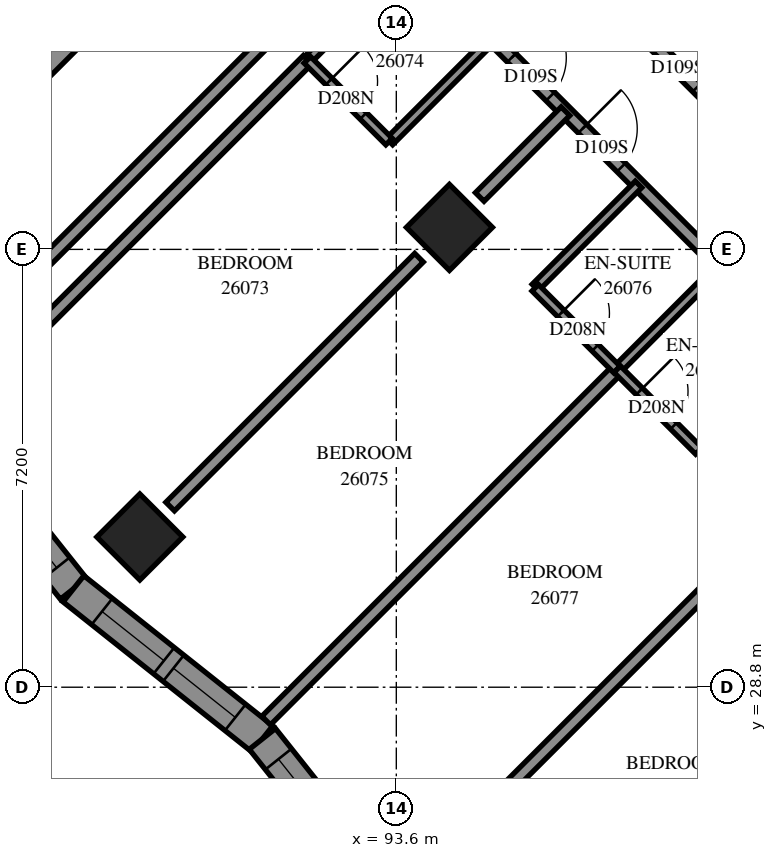
"""IFC4 building model, lengths in metres.
Left out: names, types, materials, properties, quantities, classifications, styles, units other than length and angle.
Written with IfcOpenShell. Run it as: python <this file> out.ifc"""

import sys

from ifc_helpers import new_model, si_unit, direction, frame, frame_2d, origin, origin_2d, place, context, subcontext, project, spatial, polyline, rectangle, outline, extrude, element, fill, save


model = new_model("IFC4")
c1 = context("Model", 3, precision=1e-05, world=origin(), true_north=direction((0.0, 1.0)))
c2 = subcontext(c1, "Body", "Model", "MODEL_VIEW")
j1 = project(units=[si_unit("LENGTHUNIT", "METRE"), si_unit("PLANEANGLEUNIT", "RADIAN")], contexts=[c1])
p1 = place(None, origin())
s1 = spatial("IfcSite", under=j1, at=p1, CompositionType="ELEMENT")
p2 = place(p1, origin())
s2 = spatial("IfcBuilding", under=s1, at=p2, CompositionType="ELEMENT")
p3 = place(p2, frame((0.0, 0.0, 98.2)))
s3 = spatial("IfcBuildingStorey", under=s2, at=p3, CompositionType="ELEMENT", Elevation=98.2)
for number, where, z_axis, x_axis in (
    (1, (94.474, 36.362, 0.0), (0.0, 0.0, 1.0), (0.707, -0.707, 0.0)),
    (2, (89.382, 31.271, 0.0), (0.0, 0.0, 1.0), (0.707, -0.707, 0.0)),
):
    element("IfcColumn", number, at=place(p3, frame(where, z_axis=z_axis, x_axis=x_axis)), inside=s3, PredefinedType="COLUMN", context=c2, shape_type="SweptSolid", body=[
        extrude(rectangle(XDim=1.0, YDim=1.0, at=origin_2d()), origin(), (0.0, 0.0, 1.0), 3.1),
    ])
p4 = place(p3, frame((87.12, 38.625, -0.3), z_axis=(0.0, 0.0, 1.0), x_axis=(0.7071067812, 0.7071067812, 0.0)))
e3 = element("IfcWall", 3, at=p4, inside=s3, PredefinedType="SHEAR", context=c2, shape_type="SweptSolid", body=[
    extrude(rectangle(XDim=14.4, YDim=0.8, at=frame_2d((7.2, 0.0))), origin(), (0.0, 0.0, 1.0), 2.7),
])
p5 = place(p4, frame((4.55, 0.0, 0.3)))
e4 = element("IfcOpeningElement", 4, at=p5, cuts=e3, PredefinedType="OPENING", context=c2, shape_type="SweptSolid", body=[
    extrude(rectangle(XDim=1.1, YDim=2.1, at=frame_2d((0.55, 1.05))), frame((0.0, 0.41, 0.0), z_axis=(0.0, -1.0, 0.0), x_axis=(1.0, 0.0, 0.0)), (0.0, 0.0, 1.0), 0.82),
])
p6 = place(p4, frame((11.35, 0.0, 0.3)))
e5 = element("IfcOpeningElement", 5, at=p6, cuts=e3, PredefinedType="OPENING", context=c2, shape_type="SweptSolid", body=[
    extrude(rectangle(XDim=1.1, YDim=2.1, at=frame_2d((0.55, 1.05))), frame((0.0, 0.41, 0.0), z_axis=(0.0, -1.0, 0.0), x_axis=(1.0, 0.0, 0.0)), (0.0, 0.0, 1.0), 0.82),
])
p7 = place(p3, frame((85.822, 33.525, 0.0), z_axis=(0.0, 0.0, 1.0), x_axis=(0.6221562099, -0.7828931284, 0.0)))
e6 = element("IfcWall", 6, at=p7, inside=s3, PredefinedType="SOLIDWALL", context=c2, shape_type="SweptSolid", body=[
    extrude(outline(polyline([(0.032, -0.275), (3.999, -0.275), (3.937, 0.275), (-0.032, 0.275), (0.032, -0.275)])), origin(), (0.0, 0.0, 1.0), 3.1),
])
p8 = place(p7, frame((0.726, 0.0, 0.5)))
e7 = element("IfcOpeningElement", 7, at=p8, cuts=e6, PredefinedType="OPENING", context=c2, shape_type="SweptSolid", body=[
    extrude(rectangle(XDim=1.3, YDim=2.45, at=frame_2d((0.65, 1.225))), frame((0.0, 0.285, 0.0), z_axis=(0.0, -1.0, 0.0), x_axis=(1.0, 0.0, 0.0)), (0.0, 0.0, 1.0), 0.57),
])
p9 = place(p7, frame((2.226, 0.0, 0.5)))
e8 = element("IfcOpeningElement", 8, at=p9, cuts=e6, PredefinedType="OPENING", context=c2, shape_type="SweptSolid", body=[
    extrude(rectangle(XDim=1.3, YDim=2.45, at=frame_2d((0.65, 1.225))), frame((0.0, 0.285, 0.0), z_axis=(0.0, -1.0, 0.0), x_axis=(1.0, 0.0, 0.0)), (0.0, 0.0, 1.0), 0.57),
])
p10 = place(p3, frame((88.291, 30.419, 0.0), z_axis=(0.0, 0.0, 1.0), x_axis=(0.7829028832, -0.6221439347, 0.0)))
e9 = element("IfcWall", 9, at=p10, inside=s3, PredefinedType="SOLIDWALL", context=c2, shape_type="SweptSolid", body=[
    extrude(outline(polyline([(-0.032, -0.275), (3.937, -0.275), (3.999, 0.275), (0.032, 0.275), (-0.032, -0.275)])), origin(), (0.0, 0.0, 1.0), 3.1),
])
p11 = place(p10, frame((0.6, 0.0, 0.5)))
e10 = element("IfcOpeningElement", 10, at=p11, cuts=e9, PredefinedType="OPENING", context=c2, shape_type="SweptSolid", body=[
    extrude(rectangle(XDim=1.3, YDim=2.45, at=frame_2d((0.65, 1.225))), frame((0.0, 0.285, 0.0), z_axis=(0.0, -1.0, 0.0), x_axis=(1.0, 0.0, 0.0)), (0.0, 0.0, 1.0), 0.57),
])
p12 = place(p10, frame((2.1, 0.0, 0.5)))
e11 = element("IfcOpeningElement", 11, at=p12, cuts=e9, PredefinedType="OPENING", context=c2, shape_type="SweptSolid", body=[
    extrude(rectangle(XDim=1.3, YDim=2.45, at=frame_2d((0.65, 1.225))), frame((0.0, 0.285, 0.0), z_axis=(0.0, -1.0, 0.0), x_axis=(1.0, 0.0, 0.0)), (0.0, 0.0, 1.0), 0.57),
])
p13 = place(p3, frame((91.398, 27.95, 0.0), z_axis=(0.0, 0.0, 1.0), x_axis=(0.6221439347, -0.7829028832, 0.0)))
e12 = element("IfcWall", 12, at=p13, inside=s3, PredefinedType="SOLIDWALL", context=c2, shape_type="SweptSolid", body=[
    extrude(outline(polyline([(0.032, -0.275), (3.999, -0.275), (3.937, 0.275), (-0.032, 0.275), (0.032, -0.275)])), origin(), (0.0, 0.0, 1.0), 3.1),
])
p14 = place(p13, frame((0.425, 0.0, 0.5)))
e13 = element("IfcOpeningElement", 13, at=p14, cuts=e12, PredefinedType="OPENING", context=c2, shape_type="SweptSolid", body=[
    extrude(rectangle(XDim=1.3, YDim=2.45, at=frame_2d((0.65, 1.225))), frame((0.0, 0.285, 0.0), z_axis=(0.0, -1.0, 0.0), x_axis=(1.0, 0.0, 0.0)), (0.0, 0.0, 1.0), 0.57),
])
p15 = place(p13, frame((1.925, 0.0, 0.5)))
e14 = element("IfcOpeningElement", 14, at=p15, cuts=e12, PredefinedType="OPENING", context=c2, shape_type="SweptSolid", body=[
    extrude(rectangle(XDim=1.3, YDim=2.45, at=frame_2d((0.65, 1.225))), frame((0.0, 0.285, 0.0), z_axis=(0.0, -1.0, 0.0), x_axis=(1.0, 0.0, 0.0)), (0.0, 0.0, 1.0), 0.57),
])
p16 = place(p3, frame((93.339, 41.309, 0.0), z_axis=(0.0, 0.0, 1.0), x_axis=(0.7071067812, -0.7071067812, 0.0)))
e15 = element("IfcWall", 15, at=p16, inside=s3, PredefinedType="PARTITIONING", context=c2, shape_type="SweptSolid", body=[
    extrude(rectangle(XDim=18.702, YDim=0.2, at=frame_2d((9.351, 0.0))), origin(), (0.0, 0.0, 1.0), 3.1),
])
p17 = place(p16, frame((3.05, 0.0, 0.0)))
e16 = element("IfcOpeningElement", 16, at=p17, cuts=e15, PredefinedType="OPENING", context=c2, shape_type="SweptSolid", body=[
    extrude(rectangle(XDim=0.9, YDim=2.1, at=frame_2d((0.45, 1.05))), frame((0.0, 0.11, 0.0), z_axis=(0.0, -1.0, 0.0), x_axis=(1.0, 0.0, 0.0)), (0.0, 0.0, 1.0), 0.22),
])
p18 = place(p16, frame((4.7, 0.0, 0.0)))
e17 = element("IfcOpeningElement", 17, at=p18, cuts=e15, PredefinedType="OPENING", context=c2, shape_type="SweptSolid", body=[
    extrude(rectangle(XDim=0.9, YDim=2.1, at=frame_2d((0.45, 1.05))), frame((0.0, 0.11, 0.0), z_axis=(0.0, -1.0, 0.0), x_axis=(1.0, 0.0, 0.0)), (0.0, 0.0, 1.0), 0.22),
])
p19 = place(p16, frame((10.149, 0.0, 0.0)))
e18 = element("IfcOpeningElement", 18, at=p19, cuts=e15, PredefinedType="OPENING", context=c2, shape_type="SweptSolid", body=[
    extrude(rectangle(XDim=0.9, YDim=2.1, at=frame_2d((0.45, 1.05))), frame((0.0, 0.11, 0.0), z_axis=(0.0, -1.0, 0.0), x_axis=(1.0, 0.0, 0.0)), (0.0, 0.0, 1.0), 0.22),
])
p20 = place(p16, frame((11.9, 0.0, 0.0)))
e19 = element("IfcOpeningElement", 19, at=p20, cuts=e15, PredefinedType="OPENING", context=c2, shape_type="SweptSolid", body=[
    extrude(rectangle(XDim=0.9, YDim=2.1, at=frame_2d((0.45, 1.05))), frame((0.0, 0.11, 0.0), z_axis=(0.0, -1.0, 0.0), x_axis=(1.0, 0.0, 0.0)), (0.0, 0.0, 1.0), 0.22),
])
p21 = place(p16, frame((17.45, 0.0, 0.0)))
e20 = element("IfcOpeningElement", 20, at=p21, cuts=e15, PredefinedType="OPENING", context=c2, shape_type="SweptSolid", body=[
    extrude(rectangle(XDim=0.9, YDim=2.1, at=frame_2d((0.45, 1.05))), frame((0.0, 0.11, 0.0), z_axis=(0.0, -1.0, 0.0), x_axis=(1.0, 0.0, 0.0)), (0.0, 0.0, 1.0), 0.22),
])
p22 = place(p3, frame((86.835, 34.806, 0.0), z_axis=(0.0, 0.0, 1.0), x_axis=(0.7071067812, 0.7071067812, 0.0)))
e21 = element("IfcWall", 21, at=p22, inside=s3, PredefinedType="PARTITIONING", context=c2, shape_type="SweptSolid", body=[
    extrude(rectangle(XDim=9.201, YDim=0.2, at=frame_2d((4.601, 0.0))), origin(), (0.0, 0.0, 1.0), 3.1),
])
p23 = place(p3, frame((96.492, 23.108, 0.0), z_axis=(0.0, 0.0, 1.0), x_axis=(0.7071128444, 0.7071007179, 0.0)))
e22 = element("IfcWall", 22, at=p23, inside=s3, PredefinedType="PARTITIONING", context=c2, shape_type="SweptSolid", body=[
    extrude(rectangle(XDim=8.246, YDim=0.2, at=frame_2d((4.123, 0.0))), origin(), (0.0, 0.0, 1.0), 3.1),
])
p24 = place(p3, frame((86.341, 33.315, 0.0), z_axis=(0.0, 0.0, 1.0), x_axis=(0.7069849041, 0.7072286373, 0.0)))
e23 = element("IfcWall", 23, at=p24, inside=s3, PredefinedType="PARTITIONING", context=c2, shape_type="SweptSolid", body=[
    extrude(rectangle(XDim=8.206, YDim=0.2, at=frame_2d((4.103, 0.0))), origin(), (0.0, 0.0, 1.0), 3.1),
])
p25 = place(p3, frame((91.46, 28.252, 0.0), z_axis=(0.0, 0.0, 1.0), x_axis=(0.7072292282, 0.706984313, 0.0)))
e24 = element("IfcWall", 24, at=p25, inside=s3, PredefinedType="PARTITIONING", context=c2, shape_type="SweptSolid", body=[
    extrude(rectangle(XDim=8.166, YDim=0.2, at=frame_2d((4.083, 0.0))), origin(), (0.0, 0.0, 1.0), 3.1),
])
p26 = place(p3, frame((94.62, 42.587, 0.0), z_axis=(0.0, 0.0, 1.0), x_axis=(0.7071067812, -0.7071067812, 0.0)))
e25 = element("IfcWall", 25, at=p26, inside=s3, PredefinedType="PARTITIONING", context=c2, shape_type="SweptSolid", body=[
    extrude(rectangle(XDim=7.9, YDim=0.2, at=frame_2d((3.95, 0.0))), origin(), (0.0, 0.0, 1.0), 3.1),
])
p27 = place(p26, frame((2.998, 0.0, 0.0)))
e26 = element("IfcOpeningElement", 26, at=p27, cuts=e25, PredefinedType="OPENING", context=c2, shape_type="SweptSolid", body=[
    extrude(rectangle(XDim=0.9, YDim=2.1, at=frame_2d((0.45, 1.05))), frame((0.0, 0.11, 0.0), z_axis=(0.0, -1.0, 0.0), x_axis=(1.0, 0.0, 0.0)), (0.0, 0.0, 1.0), 0.22),
])
p28 = place(p26, frame((4.649, 0.0, 0.0)))
e27 = element("IfcOpeningElement", 27, at=p28, cuts=e25, PredefinedType="OPENING", context=c2, shape_type="SweptSolid", body=[
    extrude(rectangle(XDim=0.9, YDim=2.1, at=frame_2d((0.45, 1.05))), frame((0.0, 0.11, 0.0), z_axis=(0.0, -1.0, 0.0), x_axis=(1.0, 0.0, 0.0)), (0.0, 0.0, 1.0), 0.22),
])
p29 = place(p3, frame((89.881, 31.771, 0.0), z_axis=(0.0, 0.0, 1.0), x_axis=(0.7071067812, 0.7071067812, 0.0)))
e28 = element("IfcWall", 28, at=p29, inside=s3, PredefinedType="PARTITIONING", context=c2, shape_type="SweptSolid", body=[
    extrude(rectangle(XDim=5.787, YDim=0.2, at=frame_2d((2.893, 0.0))), origin(), (0.0, 0.0, 1.0), 3.1),
])
p30 = place(p3, frame((94.973, 26.681, 0.0), z_axis=(0.0, 0.0, 1.0), x_axis=(0.7071067812, 0.7071067812, 0.0)))
e29 = element("IfcWall", 29, at=p30, inside=s3, PredefinedType="PARTITIONING", context=c2, shape_type="SweptSolid", body=[
    extrude(rectangle(XDim=5.784, YDim=0.2, at=frame_2d((2.892, 0.0))), origin(), (0.0, 0.0, 1.0), 3.1),
])
p31 = place(p3, frame((98.573, 32.685, 0.0), z_axis=(0.0, 0.0, 1.0), x_axis=(0.7071067812, 0.7071067812, 0.0)))
e30 = element("IfcWall", 30, at=p31, inside=s3, PredefinedType="PARTITIONING", context=c2, shape_type="SweptSolid", body=[
    extrude(rectangle(XDim=2.401, YDim=0.15, at=frame_2d((1.201, 0.0))), origin(), (0.0, 0.0, 1.0), 3.1),
])
for number, where, z_axis, x_axis in (
    (31, (92.143, 39.117, 0.0), (0.0, 0.0, 1.0), (0.708, 0.707, 0.0)),
    (32, (93.487, 37.773, 0.0), (0.0, 0.0, 1.0), (0.707, 0.708, 0.0)),
    (33, (97.234, 34.026, 0.0), (0.0, 0.0, 1.0), (0.707, 0.708, 0.0)),
):
    element("IfcWall", number, at=place(p3, frame(where, z_axis=z_axis, x_axis=x_axis)), inside=s3, PredefinedType="PARTITIONING", context=c2, shape_type="SweptSolid", body=[
        extrude(rectangle(XDim=2.4, YDim=0.15, at=frame_2d((1.2, 0.0))), origin(), (0.0, 0.0, 1.0), 3.1),
    ])
p32 = place(p3, frame((95.887, 35.373, 0.0), z_axis=(0.0, 0.0, 1.0), x_axis=(0.7071067812, 0.7071067812, 0.0)))
e34 = element("IfcWall", 34, at=p32, inside=s3, PredefinedType="PARTITIONING", context=c2, shape_type="SweptSolid", body=[
    extrude(rectangle(XDim=2.398, YDim=0.15, at=frame_2d((1.199, 0.0))), origin(), (0.0, 0.0, 1.0), 3.1),
])
p33 = place(p3, frame((94.972, 36.862, 0.0), z_axis=(0.0, 0.0, 1.0), x_axis=(0.7071067812, 0.7071067812, 0.0)))
e35 = element("IfcWall", 35, at=p33, inside=s3, PredefinedType="PARTITIONING", context=c2, shape_type="SweptSolid", body=[
    extrude(rectangle(XDim=1.994, YDim=0.2, at=frame_2d((0.997, 0.0))), origin(), (0.0, 0.0, 1.0), 3.1),
])
p34 = place(p3, frame((95.885, 35.369, 0.0), z_axis=(0.0, 0.0, 1.0), x_axis=(0.7071067812, -0.7071067812, 0.0)))
e36 = element("IfcWall", 36, at=p34, inside=s3, PredefinedType="PARTITIONING", context=c2, shape_type="SweptSolid", body=[
    extrude(rectangle(XDim=1.901, YDim=0.15, at=frame_2d((0.95, 0.0))), origin(), (0.0, 0.0, 1.0), 3.1),
])
p35 = place(p34, frame((0.595, 0.0, 0.0)))
e37 = element("IfcOpeningElement", 37, at=p35, cuts=e36, PredefinedType="OPENING", context=c2, shape_type="SweptSolid", body=[
    extrude(rectangle(XDim=0.8, YDim=2.1, at=frame_2d((0.4, 1.05))), frame((0.0, 0.085, 0.0), z_axis=(0.0, -1.0, 0.0), x_axis=(1.0, 0.0, 0.0)), (0.0, 0.0, 1.0), 0.17),
])
p36 = place(p3, frame((92.137, 39.117, 0.0), z_axis=(0.0, 0.0, 1.0), x_axis=(0.7071067812, -0.7071067812, 0.0)))
e38 = element("IfcWall", 38, at=p36, inside=s3, PredefinedType="PARTITIONING", context=c2, shape_type="SweptSolid", body=[
    extrude(rectangle(XDim=1.901, YDim=0.15, at=frame_2d((0.95, 0.0))), origin(), (0.0, 0.0, 1.0), 3.1),
])
p37 = place(p36, frame((0.502, 0.0, 0.0)))
e39 = element("IfcOpeningElement", 39, at=p37, cuts=e38, PredefinedType="OPENING", context=c2, shape_type="SweptSolid", body=[
    extrude(rectangle(XDim=0.8, YDim=2.1, at=frame_2d((0.4, 1.05))), frame((0.0, 0.085, 0.0), z_axis=(0.0, -1.0, 0.0), x_axis=(1.0, 0.0, 0.0)), (0.0, 0.0, 1.0), 0.17),
])
p38 = place(p3, frame((97.233, 34.029, 0.0), z_axis=(0.0, 0.0, 1.0), x_axis=(0.7065800724, -0.7076330979, 0.0)))
e40 = element("IfcWall", 40, at=p38, inside=s3, PredefinedType="PARTITIONING", context=c2, shape_type="SweptSolid", body=[
    extrude(rectangle(XDim=1.899, YDim=0.15, at=frame_2d((0.95, 0.0))), origin(), (0.0, 0.0, 1.0), 3.1),
])
p39 = place(p38, frame((0.515, 0.0, 0.0)))
e41 = element("IfcOpeningElement", 41, at=p39, cuts=e40, PredefinedType="OPENING", context=c2, shape_type="SweptSolid", body=[
    extrude(rectangle(XDim=0.8, YDim=2.1, at=frame_2d((0.4, 1.05))), frame((0.0, 0.085, 0.0), z_axis=(0.0, -1.0, 0.0), x_axis=(1.0, 0.0, 0.0)), (0.0, 0.0, 1.0), 0.17),
])
p40 = place(p9, origin())
e42 = element("IfcWindow", 42, at=p40, inside=s3, PartitioningType="SINGLE_PANEL", PredefinedType="WINDOW", context=c2, shape_type="SweptSolid", body=[
    extrude(rectangle(XDim=1.3, YDim=2.45, at=frame_2d((0.65, 1.225))), frame((0.0, 0.155, 0.0), z_axis=(0.0, -1.0, 0.0), x_axis=(1.0, 0.0, 0.0)), (0.0, 0.0, 1.0), 0.06),
])
fill(e8, e42)
p41 = place(p11, origin())
e43 = element("IfcWindow", 43, at=p41, inside=s3, PartitioningType="SINGLE_PANEL", PredefinedType="WINDOW", context=c2, shape_type="SweptSolid", body=[
    extrude(rectangle(XDim=1.3, YDim=2.45, at=frame_2d((0.65, 1.225))), frame((0.0, 0.155, 0.0), z_axis=(0.0, -1.0, 0.0), x_axis=(1.0, 0.0, 0.0)), (0.0, 0.0, 1.0), 0.06),
])
fill(e10, e43)
p42 = place(p12, origin())
e44 = element("IfcWindow", 44, at=p42, inside=s3, PartitioningType="SINGLE_PANEL", PredefinedType="WINDOW", context=c2, shape_type="SweptSolid", body=[
    extrude(rectangle(XDim=1.3, YDim=2.45, at=frame_2d((0.65, 1.225))), frame((0.0, 0.155, 0.0), z_axis=(0.0, -1.0, 0.0), x_axis=(1.0, 0.0, 0.0)), (0.0, 0.0, 1.0), 0.06),
])
fill(e11, e44)
p43 = place(p14, origin())
e45 = element("IfcWindow", 45, at=p43, inside=s3, PartitioningType="SINGLE_PANEL", PredefinedType="WINDOW", context=c2, shape_type="SweptSolid", body=[
    extrude(rectangle(XDim=1.3, YDim=2.45, at=frame_2d((0.65, 1.225))), frame((0.0, 0.155, 0.0), z_axis=(0.0, -1.0, 0.0), x_axis=(1.0, 0.0, 0.0)), (0.0, 0.0, 1.0), 0.06),
])
fill(e13, e45)
p44 = place(p28, origin())
e46 = element("IfcDoor", 46, at=p44, inside=s3, OperationType="SINGLE_SWING_LEFT", PredefinedType="DOOR", context=c2, shape_type="SweptSolid", body=[
    extrude(rectangle(XDim=0.9, YDim=2.1, at=frame_2d((0.45, 1.05))), frame((0.0, 0.025, 0.0), z_axis=(0.0, -1.0, 0.0), x_axis=(1.0, 0.0, 0.0)), (0.0, 0.0, 1.0), 0.05),
])
fill(e27, e46)
p45 = place(p17, origin())
e47 = element("IfcDoor", 47, at=p45, inside=s3, OperationType="SINGLE_SWING_LEFT", PredefinedType="DOOR", context=c2, shape_type="SweptSolid", body=[
    extrude(rectangle(XDim=0.9, YDim=2.1, at=frame_2d((0.45, 1.05))), frame((0.0, 0.025, 0.0), z_axis=(0.0, -1.0, 0.0), x_axis=(1.0, 0.0, 0.0)), (0.0, 0.0, 1.0), 0.05),
])
fill(e16, e47)
p46 = place(p37, origin())
e48 = element("IfcDoor", 48, at=p46, inside=s3, OperationType="SINGLE_SWING_RIGHT", PredefinedType="DOOR", context=c2, shape_type="SweptSolid", body=[
    extrude(rectangle(XDim=0.8, YDim=2.1, at=frame_2d((0.4, 1.05))), frame((0.0, 0.025, 0.0), z_axis=(0.0, -1.0, 0.0), x_axis=(1.0, 0.0, 0.0)), (0.0, 0.0, 1.0), 0.05),
])
fill(e39, e48)
p47 = place(p18, origin())
e49 = element("IfcDoor", 49, at=p47, inside=s3, OperationType="SINGLE_SWING_RIGHT", PredefinedType="DOOR", context=c2, shape_type="SweptSolid", body=[
    extrude(rectangle(XDim=0.9, YDim=2.1, at=frame_2d((0.45, 1.05))), frame((0.0, 0.025, 0.0), z_axis=(0.0, -1.0, 0.0), x_axis=(1.0, 0.0, 0.0)), (0.0, 0.0, 1.0), 0.05),
])
fill(e17, e49)
p48 = place(p35, origin())
e50 = element("IfcDoor", 50, at=p48, inside=s3, OperationType="SINGLE_SWING_RIGHT", PredefinedType="DOOR", context=c2, shape_type="SweptSolid", body=[
    extrude(rectangle(XDim=0.8, YDim=2.1, at=frame_2d((0.4, 1.05))), frame((0.0, 0.025, 0.0), z_axis=(0.0, -1.0, 0.0), x_axis=(1.0, 0.0, 0.0)), (0.0, 0.0, 1.0), 0.05),
])
fill(e37, e50)
p49 = place(p39, origin())
e51 = element("IfcDoor", 51, at=p49, inside=s3, OperationType="SINGLE_SWING_RIGHT", PredefinedType="DOOR", context=c2, shape_type="SweptSolid", body=[
    extrude(rectangle(XDim=0.8, YDim=2.1, at=frame_2d((0.4, 1.05))), frame((0.0, 0.025, 0.0), z_axis=(0.0, -1.0, 0.0), x_axis=(1.0, 0.0, 0.0)), (0.0, 0.0, 1.0), 0.05),
])
fill(e41, e51)
save(model, sys.argv[1])
